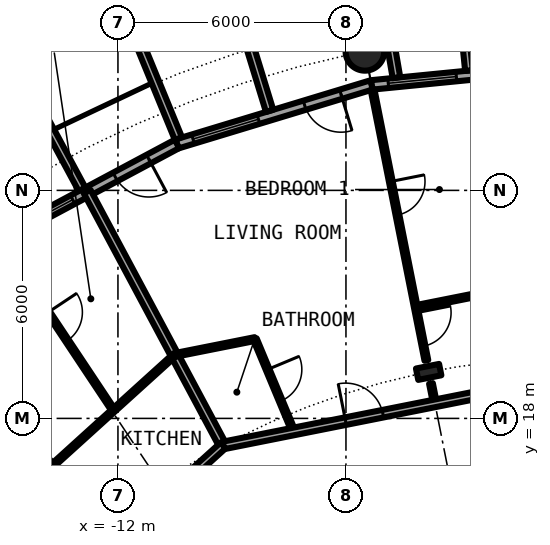
"""IFC4 building model, lengths in metres.
Left out: names, types, materials, properties, quantities, classifications, styles, units other than length and angle.
Written with IfcOpenShell. Run it as: python <this file> out.ifc"""

import sys

from ifc_helpers import new_model, si_unit, direction, frame, frame_2d, origin, origin_2d, place, context, subcontext, project, spatial, rectangle, hollow_circle, i_section, extrude, element, fill, save


model = new_model("IFC4")
c1 = context("Model", 3, precision=1e-05, world=origin(), true_north=direction((0.0, 1.0)))
c2 = subcontext(c1, "Body", "Model", "MODEL_VIEW")
j1 = project(units=[si_unit("LENGTHUNIT", "METRE"), si_unit("PLANEANGLEUNIT", "RADIAN")], contexts=[c1])
p1 = place(None, origin())
s1 = spatial("IfcSite", under=j1, at=p1, CompositionType="ELEMENT")
p2 = place(p1, origin())
s2 = spatial("IfcBuilding", under=s1, at=p2, CompositionType="ELEMENT")
p3 = place(p2, frame((0.0, 0.0, 35.0)))
s3 = spatial("IfcBuildingStorey", under=s2, at=p3, CompositionType="ELEMENT", Elevation=35.0)
p4 = place(p3, frame((-5.501, 27.658, 0.0), z_axis=(0.0, 0.0, 1.0), x_axis=(1.0, 0.0, 0.0)))
e1 = element("IfcColumn", 1, at=p4, inside=s3, PredefinedType="COLUMN", context=c2, shape_type="SweptSolid", body=[
    extrude(hollow_circle(Radius=0.508, WallThickness=0.05, at=origin_2d()), origin(), (0.0, 0.0, 1.0), 3.05),
])
p5 = place(p3, frame((-3.824, 19.223, 0.0), z_axis=(0.0, 0.0, 1.0), x_axis=(-0.195090322016, 0.980785280403, 0.0)))
e2 = element("IfcColumn", 2, at=p5, inside=s3, PredefinedType="COLUMN", context=c2, shape_type="SweptSolid", body=[
    extrude(i_section(OverallWidth=0.305, OverallDepth=0.62, WebThickness=0.021, FlangeThickness=0.04, FilletRadius=0.027, at=origin_2d()), origin(), (0.0, 0.0, 1.0), 3.05),
])
p6 = place(p3, frame((0.0, 27.3, 0.0), z_axis=(0.0, 0.0, 1.0), x_axis=(-0.995173996315, -0.098126026407, 0.0)))
e3 = element("IfcWall", 3, at=p6, inside=s3, PredefinedType="SOLIDWALL", context=c2, shape_type="SweptSolid", body=[
    extrude(rectangle(XDim=5.352, YDim=0.25, at=frame_2d((2.676, 0.0))), origin(), (0.0, 0.0, 1.0), 2.7),
])
p7 = place(p6, frame((0.841, 0.0, 0.0)))
e4 = element("IfcOpeningElement", 4, at=p7, cuts=e3, PredefinedType="OPENING", context=c2, shape_type="SweptSolid", body=[
    extrude(rectangle(XDim=1.0, YDim=2.2, at=frame_2d((0.5, 1.1))), frame((0.0, 0.135, 0.0), z_axis=(0.0, -1.0, 0.0), x_axis=(1.0, 0.0, 0.0)), (0.0, 0.0, 1.0), 0.27),
])
p8 = place(p6, frame((3.111, 0.0, 0.3)))
e5 = element("IfcOpeningElement", 5, at=p8, cuts=e3, PredefinedType="OPENING", context=c2, shape_type="SweptSolid", body=[
    extrude(rectangle(XDim=1.8, YDim=2.1, at=frame_2d((0.9, 1.05))), frame((0.0, 0.135, 0.0), z_axis=(0.0, -1.0, 0.0), x_axis=(1.0, 0.0, 0.0)), (0.0, 0.0, 1.0), 0.27),
])
p9 = place(p3, frame((-2.764, 27.153, -0.03), z_axis=(0.0, 0.0, 1.0), x_axis=(-0.101505487237, 0.994834979311, 0.0)))
e6 = element("IfcWall", 6, at=p9, inside=s3, PredefinedType="SOLIDWALL", context=c2, shape_type="SweptSolid", body=[
    extrude(rectangle(XDim=3.007, YDim=0.2, at=frame_2d((1.503, 0.0))), origin(), (0.0, 0.0, 1.0), 2.73),
])
p10 = place(p3, frame((-4.671, 26.966, -0.03), z_axis=(0.0, 0.0, 1.0), x_axis=(-0.170539878907, 0.985350774954, 0.0)))
e7 = element("IfcWall", 7, at=p10, inside=s3, PredefinedType="SOLIDWALL", context=c2, shape_type="SweptSolid", body=[
    extrude(rectangle(XDim=2.932, YDim=0.2, at=frame_2d((1.466, 0.0))), origin(), (0.0, 0.0, 1.0), 2.73),
])
p11 = place(p3, frame((-5.326, 26.775, 0.0), z_axis=(0.0, 0.0, 1.0), x_axis=(-0.956965678721, -0.290201119486, 0.0)))
e8 = element("IfcWall", 8, at=p11, inside=s3, PredefinedType="SOLIDWALL", context=c2, shape_type="SweptSolid", body=[
    extrude(rectangle(XDim=5.351, YDim=0.25, at=frame_2d((2.676, 0.0))), origin(), (0.0, 0.0, 1.0), 2.7),
])
p12 = place(p11, frame((0.841, 0.0, 0.0)))
e9 = element("IfcOpeningElement", 9, at=p12, cuts=e8, PredefinedType="OPENING", context=c2, shape_type="SweptSolid", body=[
    extrude(rectangle(XDim=1.0, YDim=2.2, at=frame_2d((0.5, 1.1))), frame((0.0, 0.135, 0.0), z_axis=(0.0, -1.0, 0.0), x_axis=(1.0, 0.0, 0.0)), (0.0, 0.0, 1.0), 0.27),
])
p13 = place(p11, frame((3.111, 0.0, 0.3)))
e10 = element("IfcOpeningElement", 10, at=p13, cuts=e8, PredefinedType="OPENING", context=c2, shape_type="SweptSolid", body=[
    extrude(rectangle(XDim=1.8, YDim=2.1, at=frame_2d((0.9, 1.05))), frame((0.0, 0.135, 0.0), z_axis=(0.0, -1.0, 0.0), x_axis=(1.0, 0.0, 0.0)), (0.0, 0.0, 1.0), 0.27),
])
p14 = place(p3, frame((-8.009, 26.092, -0.03), z_axis=(0.0, 0.0, 1.0), x_axis=(-0.293406695073, 0.955987715029, 0.0)))
e11 = element("IfcWall", 11, at=p14, inside=s3, PredefinedType="SOLIDWALL", context=c2, shape_type="SweptSolid", body=[
    extrude(rectangle(XDim=3.006, YDim=0.2, at=frame_2d((1.503, 0.0))), origin(), (0.0, 0.0, 1.0), 2.73),
])
p15 = place(p3, frame((-10.409, 25.364, -0.03), z_axis=(0.0, 0.0, 1.0), x_axis=(-0.379509886562, 0.925187681501, 0.0)))
e12 = element("IfcWall", 12, at=p15, inside=s3, PredefinedType="SOLIDWALL", context=c2, shape_type="SweptSolid", body=[
    extrude(rectangle(XDim=2.883, YDim=0.2, at=frame_2d((1.441, 0.0))), origin(), (0.0, 0.0, 1.0), 2.73),
])
p16 = place(p3, frame((-10.447, 25.222, 0.0), z_axis=(0.0, 0.0, 1.0), x_axis=(-0.881915646801, -0.471407246368, 0.0)))
e13 = element("IfcWall", 13, at=p16, inside=s3, PredefinedType="SOLIDWALL", context=c2, shape_type="SweptSolid", body=[
    extrude(rectangle(XDim=5.352, YDim=0.25, at=frame_2d((2.676, 0.0))), origin(), (0.0, 0.0, 1.0), 2.7),
])
p17 = place(p16, frame((0.841, 0.0, 0.0)))
e14 = element("IfcOpeningElement", 14, at=p17, cuts=e13, PredefinedType="OPENING", context=c2, shape_type="SweptSolid", body=[
    extrude(rectangle(XDim=1.0, YDim=2.2, at=frame_2d((0.5, 1.1))), frame((0.0, 0.135, 0.0), z_axis=(0.0, -1.0, 0.0), x_axis=(1.0, 0.0, 0.0)), (0.0, 0.0, 1.0), 0.27),
])
p18 = place(p16, frame((3.111, 0.0, 0.3)))
e15 = element("IfcOpeningElement", 15, at=p18, cuts=e13, PredefinedType="OPENING", context=c2, shape_type="SweptSolid", body=[
    extrude(rectangle(XDim=1.8, YDim=2.1, at=frame_2d((0.9, 1.05))), frame((0.0, 0.135, 0.0), z_axis=(0.0, -1.0, 0.0), x_axis=(1.0, 0.0, 0.0)), (0.0, 0.0, 1.0), 0.27),
])
p19 = place(p3, frame((-12.945, 24.029, -0.03), z_axis=(0.0, 0.0, 1.0), x_axis=(-0.474424310775, 0.88029629861, 0.0)))
e16 = element("IfcWall", 16, at=p19, inside=s3, PredefinedType="SOLIDWALL", context=c2, shape_type="SweptSolid", body=[
    extrude(rectangle(XDim=3.006, YDim=0.2, at=frame_2d((1.503, 0.0))), origin(), (0.0, 0.0, 1.0), 2.73),
])
p20 = place(p3, frame((-17.219, 21.023, 0.0), z_axis=(0.0, 0.0, 1.0), x_axis=(0.633664062855, -0.773608334654, 0.0)))
e17 = element("IfcWall", 17, at=p20, inside=s3, PredefinedType="PARTITIONING", context=c2, shape_type="SweptSolid", body=[
    extrude(rectangle(XDim=8.138, YDim=0.1, at=frame_2d((4.069, 0.0))), origin(), (0.0, 0.0, 1.0), 2.7),
])
p21 = place(p20, frame((6.377, 0.0, 0.0)))
e18 = element("IfcOpeningElement", 18, at=p21, cuts=e17, PredefinedType="OPENING", context=c2, shape_type="SweptSolid", body=[
    extrude(rectangle(XDim=0.9, YDim=2.3, at=frame_2d((0.45, 1.15))), frame((0.0, 0.06, 0.0), z_axis=(0.0, -1.0, 0.0), x_axis=(1.0, 0.0, 0.0)), (0.0, 0.0, 1.0), 0.12),
])
p22 = place(p20, frame((2.308, 0.0, 0.0)))
e19 = element("IfcOpeningElement", 19, at=p22, cuts=e17, PredefinedType="OPENING", context=c2, shape_type="SweptSolid", body=[
    extrude(rectangle(XDim=0.9, YDim=2.3, at=frame_2d((0.45, 1.15))), frame((0.0, 0.06, 0.0), z_axis=(0.0, -1.0, 0.0), x_axis=(1.0, 0.0, 0.0)), (0.0, 0.0, 1.0), 0.12),
])
p23 = place(p3, frame((-15.054, 22.624, 0.0), z_axis=(0.0, 0.0, 1.0), x_axis=(0.553913391217, -0.832574294, 0.0)))
e20 = element("IfcWall", 20, at=p23, inside=s3, PredefinedType="PARTITIONING", context=c2, shape_type="SweptSolid", body=[
    extrude(rectangle(XDim=5.301, YDim=0.1, at=frame_2d((2.65, 0.0))), origin(), (0.0, 0.0, 1.0), 2.7),
])
p24 = place(p23, frame((2.2, 0.0, 0.0)))
e21 = element("IfcOpeningElement", 21, at=p24, cuts=e20, PredefinedType="OPENING", context=c2, shape_type="SweptSolid", body=[
    extrude(rectangle(XDim=0.9, YDim=2.3, at=frame_2d((0.45, 1.15))), frame((0.0, 0.06, 0.0), z_axis=(0.0, -1.0, 0.0), x_axis=(1.0, 0.0, 0.0)), (0.0, 0.0, 1.0), 0.12),
])
p25 = place(p3, frame((-12.81, 23.966, 0.0), z_axis=(0.0, 0.0, 1.0), x_axis=(0.471439510802, -0.881898399848, 0.0)))
e22 = element("IfcWall", 22, at=p25, inside=s3, PredefinedType="PARTITIONING", context=c2, shape_type="SweptSolid", body=[
    extrude(rectangle(XDim=7.575, YDim=0.2, at=frame_2d((3.787, 0.0))), origin(), (0.0, 0.0, 1.0), 2.7),
])
p26 = place(p3, frame((-8.396, 20.088, 0.0), z_axis=(0.0, 0.0, 1.0), x_axis=(0.385844829344, -0.922563693014, 0.0)))
e23 = element("IfcWall", 23, at=p26, inside=s3, PredefinedType="PARTITIONING", context=c2, shape_type="SweptSolid", body=[
    extrude(rectangle(XDim=2.636, YDim=0.1, at=frame_2d((1.318, 0.0))), origin(), (0.0, 0.0, 1.0), 2.7),
])
p27 = place(p26, frame((0.868, 0.0, 0.0)))
e24 = element("IfcOpeningElement", 24, at=p27, cuts=e23, PredefinedType="OPENING", context=c2, shape_type="SweptSolid", body=[
    extrude(rectangle(XDim=0.9, YDim=2.3, at=frame_2d((0.45, 1.15))), frame((0.0, 0.06, 0.0), z_axis=(0.0, -1.0, 0.0), x_axis=(1.0, 0.0, 0.0)), (0.0, 0.0, 1.0), 0.12),
])
p28 = place(p3, frame((-5.301, 26.653, 0.0), z_axis=(0.0, 0.0, 1.0), x_axis=(0.19503038749, -0.980797200218, 0.0)))
e25 = element("IfcWall", 25, at=p28, inside=s3, PredefinedType="PARTITIONING", context=c2, shape_type="SweptSolid", body=[
    extrude(rectangle(XDim=7.265, YDim=0.1, at=frame_2d((3.633, 0.0))), origin(), (0.0, 0.0, 1.0), 2.7),
])
p29 = place(p28, frame((5.985, 0.0, 0.0)))
e26 = element("IfcOpeningElement", 26, at=p29, cuts=e25, PredefinedType="OPENING", context=c2, shape_type="SweptSolid", body=[
    extrude(rectangle(XDim=0.9, YDim=2.3, at=frame_2d((0.45, 1.15))), frame((0.0, 0.06, 0.0), z_axis=(0.0, -1.0, 0.0), x_axis=(1.0, 0.0, 0.0)), (0.0, 0.0, 1.0), 0.12),
])
p30 = place(p28, frame((2.467, 0.0, 0.0)))
e27 = element("IfcOpeningElement", 27, at=p30, cuts=e25, PredefinedType="OPENING", context=c2, shape_type="SweptSolid", body=[
    extrude(rectangle(XDim=0.9, YDim=2.3, at=frame_2d((0.45, 1.15))), frame((0.0, 0.06, 0.0), z_axis=(0.0, -1.0, 0.0), x_axis=(1.0, 0.0, 0.0)), (0.0, 0.0, 1.0), 0.12),
])
p31 = place(p3, frame((-3.763, 18.919, 0.0), z_axis=(0.0, 0.0, 1.0), x_axis=(0.195059361677, -0.98079143829, 0.0)))
e28 = element("IfcWall", 28, at=p31, inside=s3, PredefinedType="PARTITIONING", context=c2, shape_type="SweptSolid", body=[
    extrude(rectangle(XDim=0.533, YDim=0.1, at=frame_2d((0.267, 0.0))), origin(), (0.0, 0.0, 1.0), 2.7),
])
p32 = place(p3, frame((-9.239, 17.286, 0.0), z_axis=(0.0, 0.0, 1.0), x_axis=(0.98077905287, 0.195121627328, 0.0)))
e29 = element("IfcWall", 29, at=p32, inside=s3, PredefinedType="PARTITIONING", context=c2, shape_type="SweptSolid", body=[
    extrude(rectangle(XDim=11.379, YDim=0.2, at=frame_2d((5.689, 0.0))), origin(), (0.0, 0.0, 1.0), 2.38),
])
p33 = place(p32, frame((3.293, 0.0, 0.0)))
e30 = element("IfcOpeningElement", 30, at=p33, cuts=e29, PredefinedType="OPENING", context=c2, shape_type="SweptSolid", body=[
    extrude(rectangle(XDim=1.0, YDim=2.3, at=frame_2d((0.5, 1.15))), frame((0.0, 0.11, 0.0), z_axis=(0.0, -1.0, 0.0), x_axis=(1.0, 0.0, 0.0)), (0.0, 0.0, 1.0), 0.22),
])
p34 = place(p3, frame((-16.18, 10.995, 0.0), z_axis=(0.0, 0.0, 1.0), x_axis=(0.74112906966, 0.671362571272, 0.0)))
e31 = element("IfcWall", 31, at=p34, inside=s3, PredefinedType="PARTITIONING", context=c2, shape_type="SweptSolid", body=[
    extrude(rectangle(XDim=9.375, YDim=0.2, at=frame_2d((4.688, 0.0))), origin(), (0.0, 0.0, 1.0), 2.38),
])
p35 = place(p34, frame((3.152, 0.0, 0.0)))
e32 = element("IfcOpeningElement", 32, at=p35, cuts=e31, PredefinedType="OPENING", context=c2, shape_type="SweptSolid", body=[
    extrude(rectangle(XDim=1.0, YDim=2.3, at=frame_2d((0.5, 1.15))), frame((0.0, 0.11, 0.0), z_axis=(0.0, -1.0, 0.0), x_axis=(1.0, 0.0, 0.0)), (0.0, 0.0, 1.0), 0.22),
])
p36 = place(p3, frame((-10.511, 19.667, 0.0), z_axis=(0.0, 0.0, 1.0), x_axis=(0.980784706341, 0.195093208, 0.0)))
e33 = element("IfcWall", 33, at=p36, inside=s3, PredefinedType="PARTITIONING", context=c2, shape_type="SweptSolid", body=[
    extrude(rectangle(XDim=2.157, YDim=0.1, at=frame_2d((1.079, 0.0))), origin(), (0.0, 0.0, 1.0), 2.7),
])
p37 = place(p3, frame((-4.163, 20.93, 0.0), z_axis=(0.0, 0.0, 1.0), x_axis=(0.98077745026, 0.195129682675, 0.0)))
e34 = element("IfcWall", 34, at=p37, inside=s3, PredefinedType="PARTITIONING", context=c2, shape_type="SweptSolid", body=[
    extrude(rectangle(XDim=6.474, YDim=0.1, at=frame_2d((3.237, 0.0))), origin(), (0.0, 0.0, 1.0), 2.7),
])
p38 = place(p3, frame((-13.727, 16.754, 0.0), z_axis=(0.0, 0.0, 1.0), x_axis=(0.741134692738, 0.671356363804, 0.0)))
e35 = element("IfcWall", 35, at=p38, inside=s3, PredefinedType="PARTITIONING", context=c2, shape_type="SweptSolid", body=[
    extrude(rectangle(XDim=4.342, YDim=0.1, at=frame_2d((2.171, 0.0))), origin(), (0.0, 0.0, 1.0), 2.7),
])
p39 = place(p8, origin())
e36 = element("IfcWindow", 36, at=p39, inside=s3, PartitioningType="SINGLE_PANEL", PredefinedType="WINDOW", context=c2, shape_type="SweptSolid", body=[
    extrude(rectangle(XDim=1.8, YDim=2.1, at=frame_2d((0.9, 1.05))), frame((0.0, 0.03, 0.0), z_axis=(0.0, -1.0, 0.0), x_axis=(1.0, 0.0, 0.0)), (0.0, 0.0, 1.0), 0.06),
])
fill(e5, e36)
p40 = place(p12, origin())
e37 = element("IfcDoor", 37, at=p40, inside=s3, OperationType="SINGLE_SWING_LEFT", PredefinedType="DOOR", context=c2, shape_type="SweptSolid", body=[
    extrude(rectangle(XDim=1.0, YDim=2.2, at=frame_2d((0.5, 1.1))), frame((0.0, 0.025, 0.0), z_axis=(0.0, -1.0, 0.0), x_axis=(1.0, 0.0, 0.0)), (0.0, 0.0, 1.0), 0.05),
])
fill(e9, e37)
p41 = place(p13, origin())
e38 = element("IfcWindow", 38, at=p41, inside=s3, PartitioningType="SINGLE_PANEL", PredefinedType="WINDOW", context=c2, shape_type="SweptSolid", body=[
    extrude(rectangle(XDim=1.8, YDim=2.1, at=frame_2d((0.9, 1.05))), frame((0.0, 0.03, 0.0), z_axis=(0.0, -1.0, 0.0), x_axis=(1.0, 0.0, 0.0)), (0.0, 0.0, 1.0), 0.06),
])
fill(e10, e38)
p42 = place(p17, origin())
e39 = element("IfcDoor", 39, at=p42, inside=s3, OperationType="SINGLE_SWING_LEFT", PredefinedType="DOOR", context=c2, shape_type="SweptSolid", body=[
    extrude(rectangle(XDim=1.0, YDim=2.2, at=frame_2d((0.5, 1.1))), frame((0.0, 0.025, 0.0), z_axis=(0.0, -1.0, 0.0), x_axis=(1.0, 0.0, 0.0)), (0.0, 0.0, 1.0), 0.05),
])
fill(e14, e39)
p43 = place(p18, origin())
e40 = element("IfcWindow", 40, at=p43, inside=s3, PartitioningType="SINGLE_PANEL", PredefinedType="WINDOW", context=c2, shape_type="SweptSolid", body=[
    extrude(rectangle(XDim=1.8, YDim=2.1, at=frame_2d((0.9, 1.05))), frame((0.0, 0.03, 0.0), z_axis=(0.0, -1.0, 0.0), x_axis=(1.0, 0.0, 0.0)), (0.0, 0.0, 1.0), 0.06),
])
fill(e15, e40)
p44 = place(p33, origin())
e41 = element("IfcDoor", 41, at=p44, inside=s3, OperationType="SINGLE_SWING_LEFT", PredefinedType="DOOR", context=c2, shape_type="SweptSolid", body=[
    extrude(rectangle(XDim=1.0, YDim=2.3, at=frame_2d((0.5, 1.15))), frame((0.0, 0.025, 0.0), z_axis=(0.0, -1.0, 0.0), x_axis=(1.0, 0.0, 0.0)), (0.0, 0.0, 1.0), 0.05),
])
fill(e30, e41)
p45 = place(p27, origin())
e42 = element("IfcDoor", 42, at=p45, inside=s3, OperationType="SINGLE_SWING_LEFT", PredefinedType="DOOR", context=c2, shape_type="SweptSolid", body=[
    extrude(rectangle(XDim=0.9, YDim=2.3, at=frame_2d((0.45, 1.15))), frame((0.0, 0.025, 0.0), z_axis=(0.0, -1.0, 0.0), x_axis=(1.0, 0.0, 0.0)), (0.0, 0.0, 1.0), 0.05),
])
fill(e24, e42)
p46 = place(p29, origin())
e43 = element("IfcDoor", 43, at=p46, inside=s3, OperationType="SINGLE_SWING_RIGHT", PredefinedType="DOOR", context=c2, shape_type="SweptSolid", body=[
    extrude(rectangle(XDim=0.9, YDim=2.3, at=frame_2d((0.45, 1.15))), frame((0.0, 0.025, 0.0), z_axis=(0.0, -1.0, 0.0), x_axis=(1.0, 0.0, 0.0)), (0.0, 0.0, 1.0), 0.05),
])
fill(e26, e43)
p47 = place(p30, origin())
e44 = element("IfcDoor", 44, at=p47, inside=s3, OperationType="SINGLE_SWING_LEFT", PredefinedType="DOOR", context=c2, shape_type="SweptSolid", body=[
    extrude(rectangle(XDim=0.9, YDim=2.3, at=frame_2d((0.45, 1.15))), frame((0.0, 0.025, 0.0), z_axis=(0.0, -1.0, 0.0), x_axis=(1.0, 0.0, 0.0)), (0.0, 0.0, 1.0), 0.05),
])
fill(e27, e44)
p48 = place(p24, origin())
e45 = element("IfcDoor", 45, at=p48, inside=s3, OperationType="SINGLE_SWING_LEFT", PredefinedType="DOOR", context=c2, shape_type="SweptSolid", body=[
    extrude(rectangle(XDim=0.9, YDim=2.3, at=frame_2d((0.45, 1.15))), frame((0.0, 0.025, 0.0), z_axis=(0.0, -1.0, 0.0), x_axis=(1.0, 0.0, 0.0)), (0.0, 0.0, 1.0), 0.05),
])
fill(e21, e45)
save(model, sys.argv[1])
